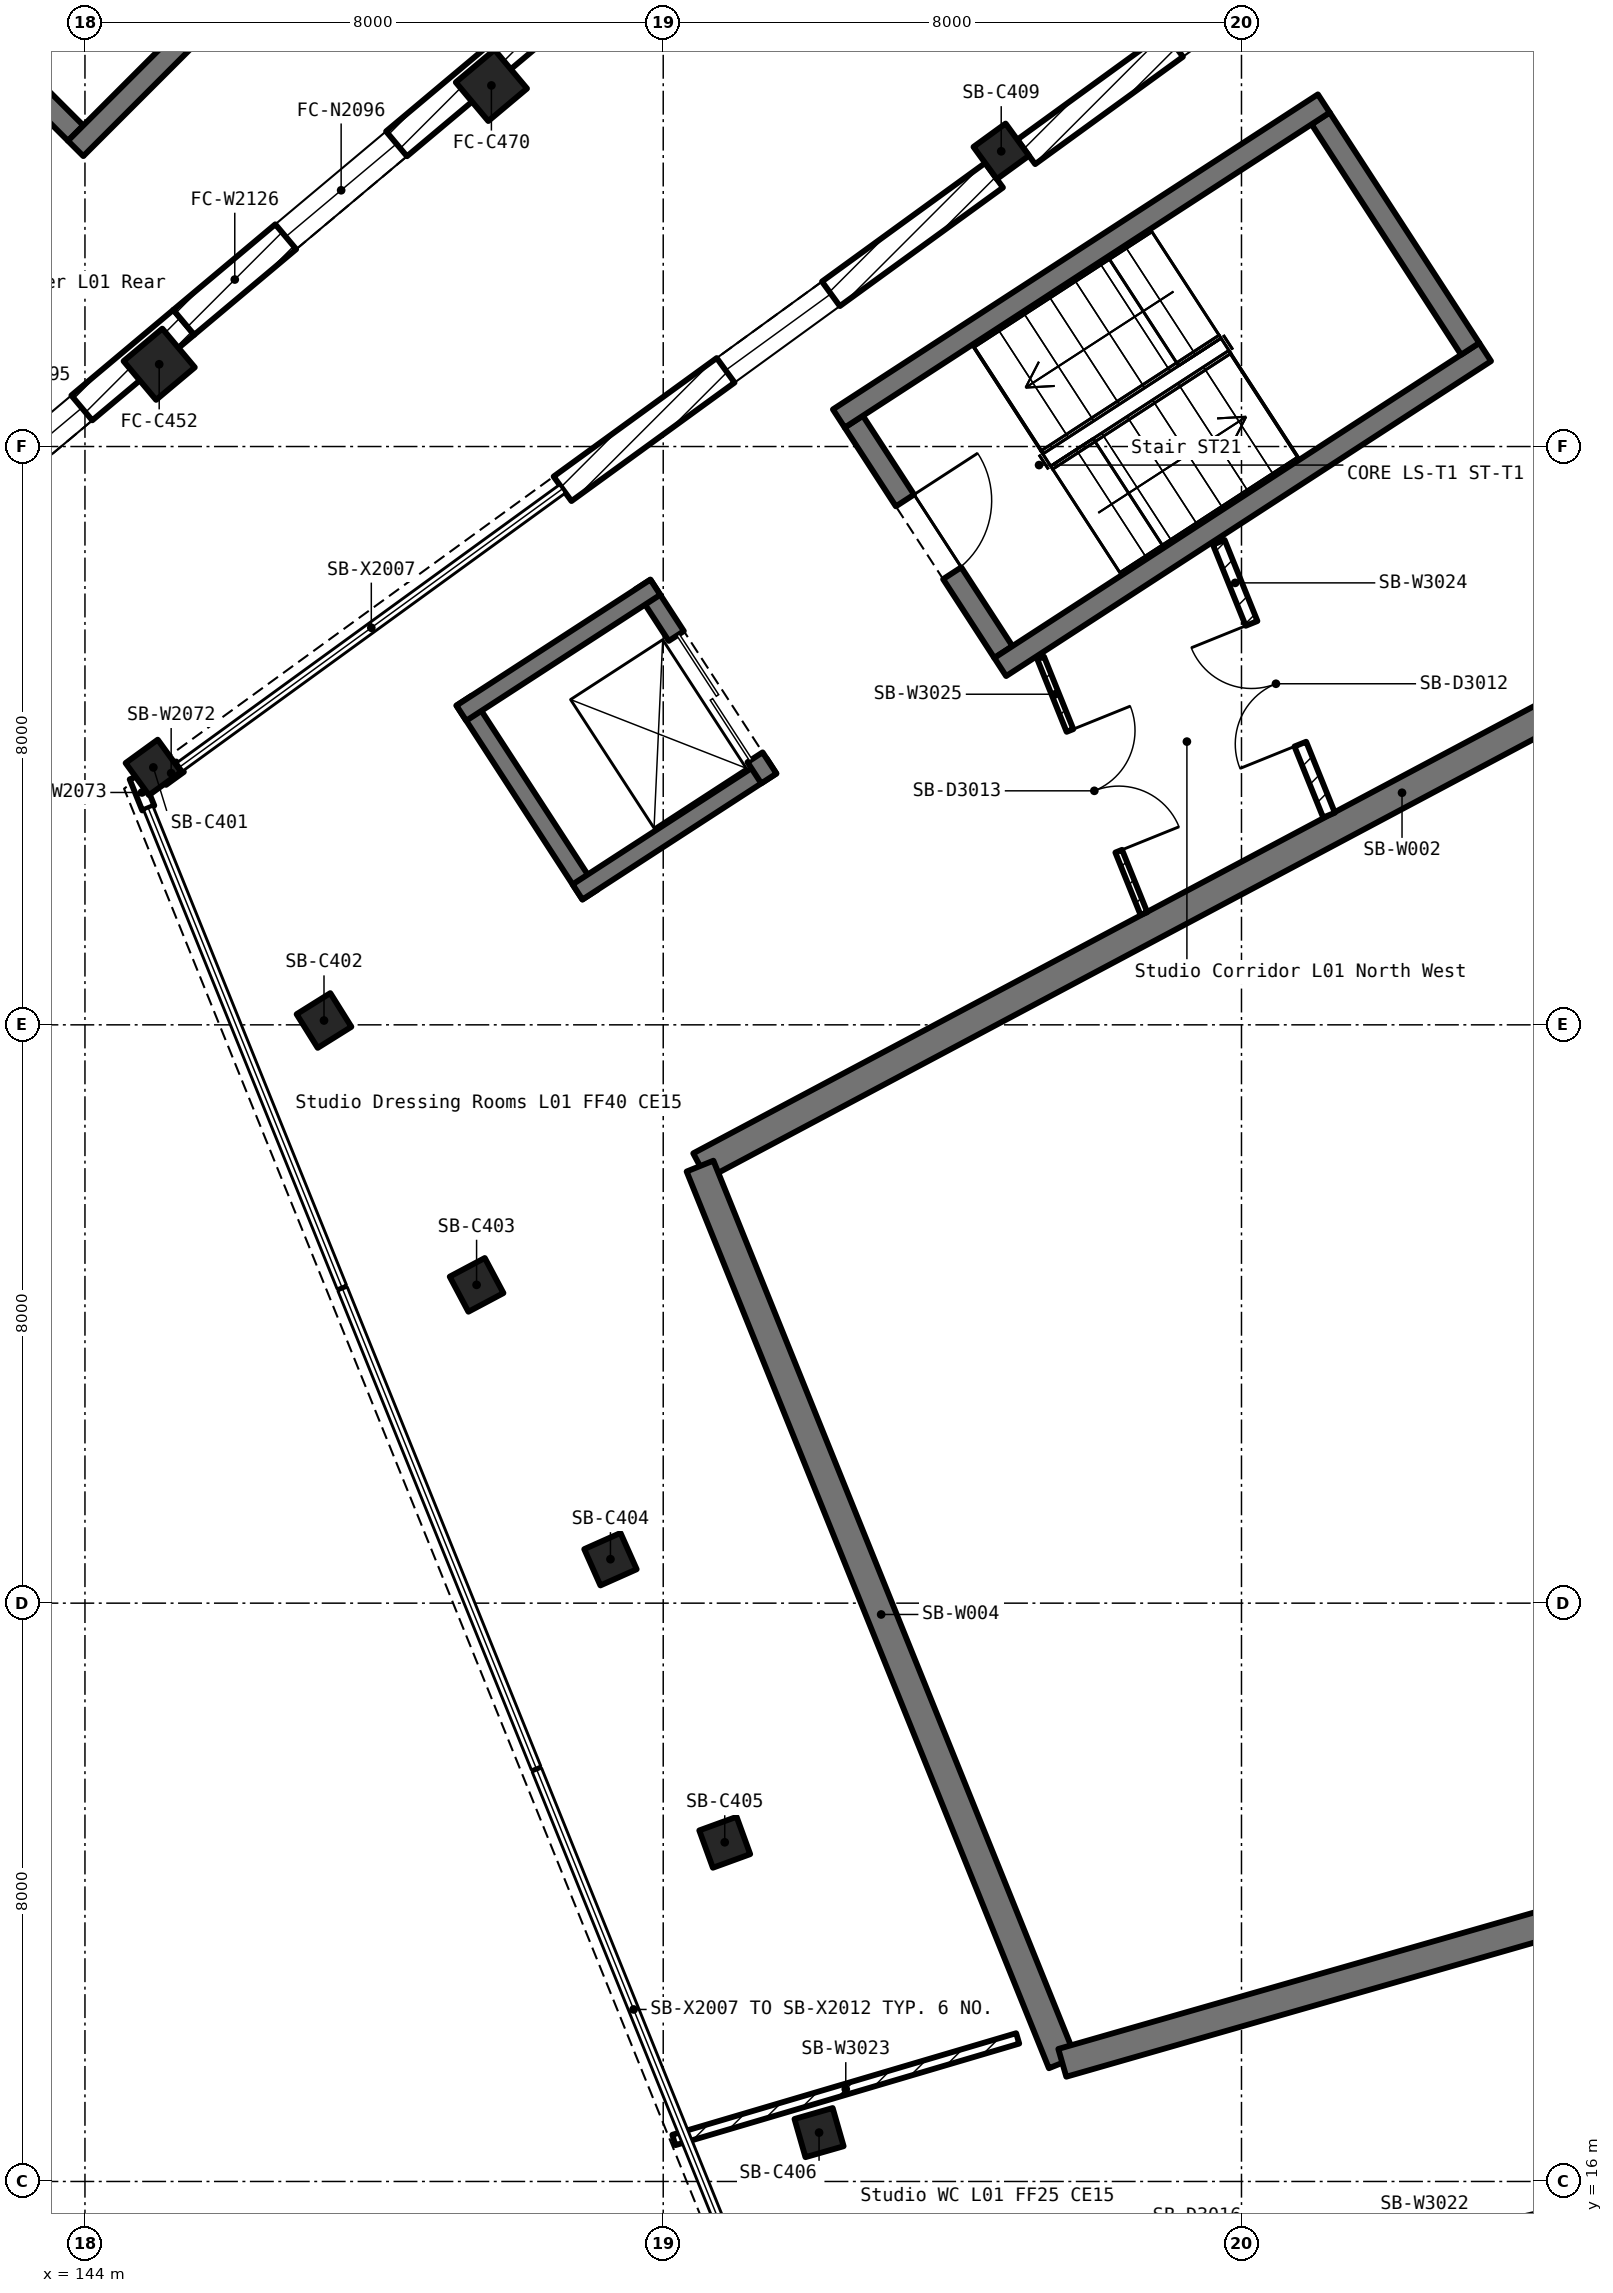
"""IFC4 building model, lengths in metres.
Left out: names, types, materials, properties, quantities, classifications, styles, units other than length and angle.
Written with IfcOpenShell. Run it as: python <this file> out.ifc"""

import sys

from ifc_helpers import new_model, si_unit, direction, frame, frame_2d, origin, origin_2d, place, context, subcontext, project, spatial, rectangle, extrude, element, fill, save


model = new_model("IFC4")
c1 = context("Model", 3, precision=1e-05, world=origin(), true_north=direction((0.0, 1.0)))
c2 = subcontext(c1, "Body", "Model", "MODEL_VIEW")
j1 = project(units=[si_unit("LENGTHUNIT", "METRE"), si_unit("PLANEANGLEUNIT", "RADIAN")], contexts=[c1])
p1 = place(None, origin())
s1 = spatial("IfcSite", under=j1, at=p1, CompositionType="ELEMENT")
p2 = place(p1, origin())
s2 = spatial("IfcBuilding", under=s1, at=p2, CompositionType="ELEMENT")
p3 = place(p2, frame((0.0, 0.0, 6.0)))
s3 = spatial("IfcBuildingStorey", under=s2, at=p3, CompositionType="ELEMENT", Elevation=6.0)
for number, where, z_axis, x_axis in (
    (1, (145.027, 41.138, 0.0), (0.0, 0.0, 1.0), (0.643, -0.766, 0.0)),
    (2, (149.623, 44.995, 0.0), (0.0, 0.0, 1.0), (0.643, -0.766, 0.0)),
):
    element("IfcColumn", number, at=place(p3, frame(where, z_axis=z_axis, x_axis=x_axis)), inside=s3, PredefinedType="COLUMN", context=c2, shape_type="SweptSolid", body=[
        extrude(rectangle(XDim=0.7, YDim=0.7, at=origin_2d()), origin(), (0.0, 0.0, 1.0), 5.5),
    ])
for number, where, z_axis, x_axis in (
    (3, (144.946, 35.561, 0.0), (0.0, 0.0, 1.0), (0.588, -0.809, 0.0)),
    (4, (147.307, 32.06, 0.0), (0.0, 0.0, 1.0), (0.53, -0.848, 0.0)),
    (5, (149.418, 28.403, 0.0), (0.0, 0.0, 1.0), (0.469, -0.883, 0.0)),
    (6, (151.27, 24.608, 0.0), (0.0, 0.0, 1.0), (0.407, -0.914, 0.0)),
    (7, (152.851, 20.692, 0.0), (0.0, 0.0, 1.0), (0.342, -0.94, 0.0)),
    (8, (154.156, 16.676, 0.0), (0.0, 0.0, 1.0), (0.276, -0.961, 0.0)),
    (9, (156.676, 44.084, 0.0), (0.0, 0.0, 1.0), (0.588, -0.809, 0.0)),
):
    element("IfcColumn", number, at=place(p3, frame(where, z_axis=z_axis, x_axis=x_axis)), inside=s3, PredefinedType="COLUMN", context=c2, shape_type="SweptSolid", body=[
        extrude(rectangle(XDim=0.55, YDim=0.55, at=origin_2d()), origin(), (0.0, 0.0, 1.0), 5.5),
    ])
p4 = place(p3, frame((171.933, 40.375, 0.0), z_axis=(0.0, 0.0, 1.0), x_axis=(-0.882926128241, -0.469511929634, 0.0)))
e10 = element("IfcWall", 10, at=p4, inside=s3, PredefinedType="SHEAR", context=c2, shape_type="SweptSolid", body=[
    extrude(rectangle(XDim=22.0, YDim=0.4, at=frame_2d((11.0, 0.0))), origin(), (0.0, 0.0, 1.0), 5.5),
])
p5 = place(p3, frame((152.509, 30.046, 0.0), z_axis=(0.0, 0.0, 1.0), x_axis=(0.374613299166, -0.92718114524, 0.0)))
e11 = element("IfcWall", 11, at=p5, inside=s3, PredefinedType="SHEAR", context=c2, shape_type="SweptSolid", body=[
    extrude(rectangle(XDim=13.379, YDim=0.4, at=frame_2d((6.689, 0.0))), origin(), (0.0, 0.0, 1.0), 5.5),
])
p6 = place(p3, frame((157.521, 17.641, 0.0), z_axis=(0.0, 0.0, 1.0), x_axis=(0.961263044958, 0.275632651182, 0.0)))
e12 = element("IfcWall", 12, at=p6, inside=s3, PredefinedType="SHEAR", context=c2, shape_type="SweptSolid", body=[
    extrude(rectangle(XDim=22.0, YDim=0.4, at=frame_2d((11.0, 0.0))), origin(), (0.0, 0.0, 1.0), 5.5),
])
p7 = place(p3, frame((141.013, 38.065, 0.0), z_axis=(0.0, 0.0, 1.0), x_axis=(0.766076229388, 0.642749726384, 0.0)))
e13 = element("IfcWall", 13, at=p7, inside=s3, PredefinedType="SOLIDWALL", context=c2, shape_type="SweptSolid", body=[
    extrude(rectangle(XDim=5.684, YDim=0.45, at=frame_2d((2.842, 0.0))), origin(), (0.0, 0.0, 1.0), 4.48),
])
p8 = place(p7, frame((1.842, 0.0, 1.0)))
e14 = element("IfcOpeningElement", 14, at=p8, cuts=e13, PredefinedType="OPENING", context=c2, shape_type="SweptSolid", body=[
    extrude(rectangle(XDim=2.0, YDim=2.8, at=frame_2d((1.0, 1.4))), frame((0.0, 0.237, 0.0), z_axis=(0.0, -1.0, 0.0), x_axis=(1.0, 0.0, 0.0)), (0.0, 0.0, 1.0), 0.474),
])
p9 = place(p3, frame((145.367, 41.718, 0.0), z_axis=(0.0, 0.0, 1.0), x_axis=(0.766076229388, 0.642749726384, 0.0)))
e15 = element("IfcWall", 15, at=p9, inside=s3, PredefinedType="SOLIDWALL", context=c2, shape_type="SweptSolid", body=[
    extrude(rectangle(XDim=5.684, YDim=0.45, at=frame_2d((2.842, 0.0))), origin(), (0.0, 0.0, 1.0), 4.48),
])
p10 = place(p9, frame((1.842, 0.0, 1.0)))
e16 = element("IfcOpeningElement", 16, at=p10, cuts=e15, PredefinedType="OPENING", context=c2, shape_type="SweptSolid", body=[
    extrude(rectangle(XDim=2.0, YDim=2.8, at=frame_2d((1.0, 1.4))), frame((0.0, 0.237, 0.0), z_axis=(0.0, -1.0, 0.0), x_axis=(1.0, 0.0, 0.0)), (0.0, 0.0, 1.0), 0.474),
])
p11 = place(p3, frame((149.721, 45.371, 0.0), z_axis=(0.0, 0.0, 1.0), x_axis=(0.766097380859, 0.642724515668, 0.0)))
e17 = element("IfcWall", 17, at=p11, inside=s3, PredefinedType="SOLIDWALL", context=c2, shape_type="SweptSolid", body=[
    extrude(rectangle(XDim=5.683, YDim=0.45, at=frame_2d((2.842, 0.0))), origin(), (0.0, 0.0, 1.0), 4.48),
])
p12 = place(p11, frame((1.842, 0.0, 1.0)))
e18 = element("IfcOpeningElement", 18, at=p12, cuts=e17, PredefinedType="OPENING", context=c2, shape_type="SweptSolid", body=[
    extrude(rectangle(XDim=2.0, YDim=2.8, at=frame_2d((1.0, 1.4))), frame((0.0, 0.237, 0.0), z_axis=(0.0, -1.0, 0.0), x_axis=(1.0, 0.0, 0.0)), (0.0, 0.0, 1.0), 0.474),
])
p13 = place(p3, frame((162.568, 48.105, 0.0), z_axis=(0.0, 0.0, 1.0), x_axis=(-0.809048605298, -0.587741741129, 0.0)))
e19 = element("IfcWall", 19, at=p13, inside=s3, PredefinedType="SOLIDWALL", context=c2, shape_type="SweptSolid", body=[
    extrude(rectangle(XDim=6.855, YDim=0.42, at=frame_2d((3.428, 0.0))), origin(), (0.0, 0.0, 1.0), 4.48),
])
p14 = place(p13, frame((2.528, 0.0, 1.0)))
e20 = element("IfcOpeningElement", 20, at=p14, cuts=e19, PredefinedType="OPENING", context=c2, shape_type="SweptSolid", body=[
    extrude(rectangle(XDim=1.8, YDim=1.5, at=frame_2d((0.9, 0.75))), frame((0.0, 0.222, 0.0), z_axis=(0.0, -1.0, 0.0), x_axis=(1.0, 0.0, 0.0)), (0.0, 0.0, 1.0), 0.444),
])
p15 = place(p3, frame((156.577, 43.752, 0.0), z_axis=(0.0, 0.0, 1.0), x_axis=(-0.809050732127, -0.587738813458, 0.0)))
e21 = element("IfcWall", 21, at=p15, inside=s3, PredefinedType="SOLIDWALL", context=c2, shape_type="SweptSolid", body=[
    extrude(rectangle(XDim=7.379, YDim=0.42, at=frame_2d((3.689, 0.0))), origin(), (0.0, 0.0, 1.0), 4.48),
])
p16 = place(p15, frame((2.79, 0.0, 1.0)))
e22 = element("IfcOpeningElement", 22, at=p16, cuts=e21, PredefinedType="OPENING", context=c2, shape_type="SweptSolid", body=[
    extrude(rectangle(XDim=1.8, YDim=1.5, at=frame_2d((0.9, 0.75))), frame((0.0, 0.222, 0.0), z_axis=(0.0, -1.0, 0.0), x_axis=(1.0, 0.0, 0.0)), (0.0, 0.0, 1.0), 0.444),
])
p17 = place(p3, frame((154.636, 40.344, 0.0), z_axis=(0.0, 0.0, 1.0), x_axis=(0.544712834543, -0.838622637355, 0.0)))
e23 = element("IfcWall", 23, at=p17, inside=s3, PredefinedType="SOLIDWALL", context=c2, shape_type="SweptSolid", body=[
    extrude(rectangle(XDim=3.8, YDim=0.3, at=frame_2d((1.9, 0.0))), origin(), (0.0, 0.0, 1.0), 5.5),
])
p18 = place(p17, frame((1.3, 0.0, 0.0)))
e24 = element("IfcOpeningElement", 24, at=p18, cuts=e23, PredefinedType="OPENING", context=c2, shape_type="SweptSolid", body=[
    extrude(rectangle(XDim=1.2, YDim=2.1, at=frame_2d((0.6, 1.05))), frame((0.0, 0.162, 0.0), z_axis=(0.0, -1.0, 0.0), x_axis=(1.0, 0.0, 0.0)), (0.0, 0.0, 1.0), 0.324),
])
p19 = place(p3, frame((156.662, 36.95, 0.0), z_axis=(0.0, 0.0, 1.0), x_axis=(0.838666673849, 0.544645031351, 0.0)))
e25 = element("IfcWall", 25, at=p19, inside=s3, PredefinedType="SOLIDWALL", context=c2, shape_type="SweptSolid", body=[
    extrude(rectangle(XDim=8.0, YDim=0.3, at=frame_2d((4.0, 0.0))), origin(), (0.0, 0.0, 1.0), 5.5),
])
p20 = place(p3, frame((163.164, 41.351, 0.0), z_axis=(0.0, 0.0, 1.0), x_axis=(-0.544414712312, 0.838816202167, 0.0)))
e26 = element("IfcWall", 26, at=p20, inside=s3, PredefinedType="SOLIDWALL", context=c2, shape_type="SweptSolid", body=[
    extrude(rectangle(XDim=3.801, YDim=0.3, at=frame_2d((1.9, 0.0))), origin(), (0.0, 0.0, 1.0), 5.5),
])
p21 = place(p3, frame((161.139, 44.746, 0.0), z_axis=(0.0, 0.0, 1.0), x_axis=(-0.838633189021, -0.544696589187, 0.0)))
e27 = element("IfcWall", 27, at=p21, inside=s3, PredefinedType="SOLIDWALL", context=c2, shape_type="SweptSolid", body=[
    extrude(rectangle(XDim=8.001, YDim=0.3, at=frame_2d((4.0, 0.0))), origin(), (0.0, 0.0, 1.0), 5.5),
])
p22 = place(p3, frame((140.335, 47.871, 0.0), z_axis=(0.0, 0.0, 1.0), x_axis=(0.707106781187, -0.707106781187, 0.0)))
e28 = element("IfcWall", 28, at=p22, inside=s3, PredefinedType="SOLIDWALL", context=c2, shape_type="SweptSolid", body=[
    extrude(rectangle(XDim=5.001, YDim=0.3, at=frame_2d((2.5, 0.0))), origin(), (0.0, 0.0, 1.0), 5.5),
])
p23 = place(p22, frame((1.9, 0.0, 0.0)))
e29 = element("IfcOpeningElement", 29, at=p23, cuts=e28, PredefinedType="OPENING", context=c2, shape_type="SweptSolid", body=[
    extrude(rectangle(XDim=1.2, YDim=2.1, at=frame_2d((0.6, 1.05))), frame((0.0, 0.162, 0.0), z_axis=(0.0, -1.0, 0.0), x_axis=(1.0, 0.0, 0.0)), (0.0, 0.0, 1.0), 0.324),
])
p24 = place(p3, frame((143.871, 44.123, 0.0), z_axis=(0.0, 0.0, 1.0), x_axis=(0.7070945738, 0.707118988363, 0.0)))
e30 = element("IfcWall", 30, at=p24, inside=s3, PredefinedType="SOLIDWALL", context=c2, shape_type="SweptSolid", body=[
    extrude(rectangle(XDim=10.0, YDim=0.3, at=frame_2d((5.0, 0.0))), origin(), (0.0, 0.0, 1.0), 5.5),
])
for number, where, z_axis, x_axis in (
    (31, (149.244, 36.485, 0.0), (0.0, 0.0, 1.0), (0.545, -0.839, 0.0)),
    (32, (150.814, 33.838, 0.0), (0.0, 0.0, 1.0), (0.839, 0.545, 0.0)),
):
    element("IfcWall", number, at=place(p3, frame(where, z_axis=z_axis, x_axis=x_axis)), inside=s3, PredefinedType="SOLIDWALL", context=c2, shape_type="SweptSolid", body=[
        extrude(rectangle(XDim=3.2, YDim=0.25, at=frame_2d((1.6, 0.0))), origin(), (0.0, 0.0, 1.0), 5.5),
    ])
p25 = place(p3, frame((153.461, 35.408, 0.0), z_axis=(0.0, 0.0, 1.0), x_axis=(-0.544746938909, 0.838600484467, 0.0)))
e33 = element("IfcWall", 33, at=p25, inside=s3, PredefinedType="SOLIDWALL", context=c2, shape_type="SweptSolid", body=[
    extrude(rectangle(XDim=3.199, YDim=0.25, at=frame_2d((1.6, 0.0))), origin(), (0.0, 0.0, 1.0), 5.5),
])
p26 = place(p25, frame((0.35, 0.0, 0.0)))
e34 = element("IfcOpeningElement", 34, at=p26, cuts=e33, PredefinedType="OPENING", context=c2, shape_type="SweptSolid", body=[
    extrude(rectangle(XDim=2.0, YDim=2.2, at=frame_2d((1.0, 1.1))), frame((0.0, 0.137, 0.0), z_axis=(0.0, -1.0, 0.0), x_axis=(1.0, 0.0, 0.0)), (0.0, 0.0, 1.0), 0.274),
])
p27 = place(p3, frame((151.891, 38.054, 0.0), z_axis=(0.0, 0.0, 1.0), x_axis=(-0.838830397361, -0.544392840201, 0.0)))
e35 = element("IfcWall", 35, at=p27, inside=s3, PredefinedType="SOLIDWALL", context=c2, shape_type="SweptSolid", body=[
    extrude(rectangle(XDim=3.2, YDim=0.25, at=frame_2d((1.6, 0.0))), origin(), (0.0, 0.0, 1.0), 5.5),
])
p28 = place(p3, frame((153.556, 13.088, 0.0), z_axis=(0.0, 0.0, 1.0), x_axis=(0.975099631728, 0.221767238799, 0.0)))
e36 = element("IfcWall", 36, at=p28, inside=s3, PredefinedType="PARTITIONING", context=c2, shape_type="SweptSolid", body=[
    extrude(rectangle(XDim=11.987, YDim=0.15, at=frame_2d((5.993, 0.0))), origin(), (0.0, 0.0, 1.0), 4.38),
])
p29 = place(p28, frame((5.529, 0.0, 0.0)))
e37 = element("IfcOpeningElement", 37, at=p29, cuts=e36, PredefinedType="OPENING", context=c2, shape_type="SweptSolid", body=[
    extrude(rectangle(XDim=0.9, YDim=2.1, at=frame_2d((0.45, 1.05))), frame((0.0, 0.087, 0.0), z_axis=(0.0, -1.0, 0.0), x_axis=(1.0, 0.0, 0.0)), (0.0, 0.0, 1.0), 0.174),
])
p30 = place(p3, frame((156.904, 17.979, 0.0), z_axis=(0.0, 0.0, 1.0), x_axis=(-0.959043541429, -0.283258690322, 0.0)))
e38 = element("IfcWall", 38, at=p30, inside=s3, PredefinedType="PARTITIONING", context=c2, shape_type="SweptSolid", body=[
    extrude(rectangle(XDim=4.96, YDim=0.15, at=frame_2d((2.48, 0.0))), origin(), (0.0, 0.0, 1.0), 4.38),
])
p31 = place(p3, frame((161.211, 34.901, 0.0), z_axis=(0.0, 0.0, 1.0), x_axis=(-0.374614769551, 0.927180551152, 0.0)))
e39 = element("IfcWall", 39, at=p31, inside=s3, PredefinedType="PARTITIONING", context=c2, shape_type="SweptSolid", body=[
    extrude(rectangle(XDim=4.071, YDim=0.175, at=frame_2d((2.035, 0.0))), origin(), (0.0, 0.0, 1.0), 4.38),
])
p32 = place(p31, frame((1.06, 0.0, 0.0)))
e40 = element("IfcOpeningElement", 40, at=p32, cuts=e39, PredefinedType="OPENING", context=c2, shape_type="SweptSolid", body=[
    extrude(rectangle(XDim=1.8, YDim=2.1, at=frame_2d((0.9, 1.05))), frame((0.0, 0.1, 0.0), z_axis=(0.0, -1.0, 0.0), x_axis=(1.0, 0.0, 0.0)), (0.0, 0.0, 1.0), 0.199),
])
p33 = place(p3, frame((157.222, 37.075, 0.0), z_axis=(0.0, 0.0, 1.0), x_axis=(0.374468342404, -0.927239699612, 0.0)))
e41 = element("IfcWall", 41, at=p33, inside=s3, PredefinedType="PARTITIONING", context=c2, shape_type="SweptSolid", body=[
    extrude(rectangle(XDim=3.813, YDim=0.1, at=frame_2d((1.907, 0.0))), origin(), (0.0, 0.0, 1.0), 4.38),
])
p34 = place(p33, frame((1.082, 0.0, 0.0)))
e42 = element("IfcOpeningElement", 42, at=p34, cuts=e41, PredefinedType="OPENING", context=c2, shape_type="SweptSolid", body=[
    extrude(rectangle(XDim=1.8, YDim=2.1, at=frame_2d((0.9, 1.05))), frame((0.0, 0.062, 0.0), z_axis=(0.0, -1.0, 0.0), x_axis=(1.0, 0.0, 0.0)), (0.0, 0.0, 1.0), 0.124),
])
p35 = place(p3, frame((145.316, 35.571, 0.0), z_axis=(0.0, 0.0, 1.0), x_axis=(-0.809600929575, -0.586980693747, 0.0)))
e43 = element("IfcWall", 43, at=p35, inside=s3, PredefinedType="SOLIDWALL", context=c2, shape_type="SweptSolid", body=[
    extrude(rectangle(XDim=0.305, YDim=0.18, at=frame_2d((0.152, 0.0))), origin(), (0.0, 0.0, 1.0), 3.63),
])
p36 = place(p3, frame((144.876, 34.999, 0.0), z_axis=(0.0, 0.0, 1.0), x_axis=(-0.374558592096, 0.927203246914, 0.0)))
e44 = element("IfcWall", 44, at=p36, inside=s3, PredefinedType="SOLIDWALL", context=c2, shape_type="SweptSolid", body=[
    extrude(rectangle(XDim=0.465, YDim=0.18, at=frame_2d((0.232, 0.0))), origin(), (0.0, 0.0, 1.0), 4.43),
])
p37 = place(p8, origin())
e45 = element("IfcWindow", 45, at=p37, inside=s3, PartitioningType="DOUBLE_PANEL_VERTICAL", PredefinedType="WINDOW", context=c2, shape_type="SweptSolid", body=[
    extrude(rectangle(XDim=2.0, YDim=2.8, at=frame_2d((1.0, 1.4))), frame((0.0, 0.03, 0.0), z_axis=(0.0, -1.0, 0.0), x_axis=(1.0, 0.0, 0.0)), (0.0, 0.0, 1.0), 0.06),
])
fill(e14, e45)
p38 = place(p10, origin())
e46 = element("IfcWindow", 46, at=p38, inside=s3, PartitioningType="DOUBLE_PANEL_VERTICAL", PredefinedType="WINDOW", context=c2, shape_type="SweptSolid", body=[
    extrude(rectangle(XDim=2.0, YDim=2.8, at=frame_2d((1.0, 1.4))), frame((0.0, 0.03, 0.0), z_axis=(0.0, -1.0, 0.0), x_axis=(1.0, 0.0, 0.0)), (0.0, 0.0, 1.0), 0.06),
])
fill(e16, e46)
p39 = place(p16, origin())
e47 = element("IfcWindow", 47, at=p39, inside=s3, PartitioningType="DOUBLE_PANEL_VERTICAL", PredefinedType="WINDOW", context=c2, shape_type="SweptSolid", body=[
    extrude(rectangle(XDim=1.8, YDim=1.5, at=frame_2d((0.9, 0.75))), frame((0.0, 0.03, 0.0), z_axis=(0.0, -1.0, 0.0), x_axis=(1.0, 0.0, 0.0)), (0.0, 0.0, 1.0), 0.06),
])
fill(e22, e47)
p40 = place(p18, origin())
e48 = element("IfcDoor", 48, at=p40, inside=s3, OperationType="SINGLE_SWING_LEFT", PredefinedType="DOOR", context=c2, shape_type="SweptSolid", body=[
    extrude(rectangle(XDim=1.2, YDim=2.1, at=frame_2d((0.6, 1.05))), frame((0.0, 0.025, 0.0), z_axis=(0.0, -1.0, 0.0), x_axis=(1.0, 0.0, 0.0)), (0.0, 0.0, 1.0), 0.05),
])
fill(e24, e48)
p41 = place(p26, origin())
e49 = element("IfcDoor", 49, at=p41, inside=s3, OperationType="DOUBLE_DOOR_SLIDING", PredefinedType="DOOR", context=c2, shape_type="SweptSolid", body=[
    extrude(rectangle(XDim=2.0, YDim=2.2, at=frame_2d((1.0, 1.1))), frame((0.0, 0.025, 0.0), z_axis=(0.0, -1.0, 0.0), x_axis=(1.0, 0.0, 0.0)), (0.0, 0.0, 1.0), 0.05),
])
fill(e34, e49)
p42 = place(p32, origin())
e50 = element("IfcDoor", 50, at=p42, inside=s3, OperationType="DOUBLE_DOOR_SINGLE_SWING", PredefinedType="DOOR", context=c2, shape_type="SweptSolid", body=[
    extrude(rectangle(XDim=1.8, YDim=2.1, at=frame_2d((0.9, 1.05))), frame((0.0, 0.025, 0.0), z_axis=(0.0, -1.0, 0.0), x_axis=(1.0, 0.0, 0.0)), (0.0, 0.0, 1.0), 0.05),
])
fill(e40, e50)
p43 = place(p34, origin())
e51 = element("IfcDoor", 51, at=p43, inside=s3, OperationType="DOUBLE_DOOR_SINGLE_SWING", PredefinedType="DOOR", context=c2, shape_type="SweptSolid", body=[
    extrude(rectangle(XDim=1.8, YDim=2.1, at=frame_2d((0.9, 1.05))), frame((0.0, 0.025, 0.0), z_axis=(0.0, -1.0, 0.0), x_axis=(1.0, 0.0, 0.0)), (0.0, 0.0, 1.0), 0.05),
])
fill(e42, e51)
save(model, sys.argv[1])
